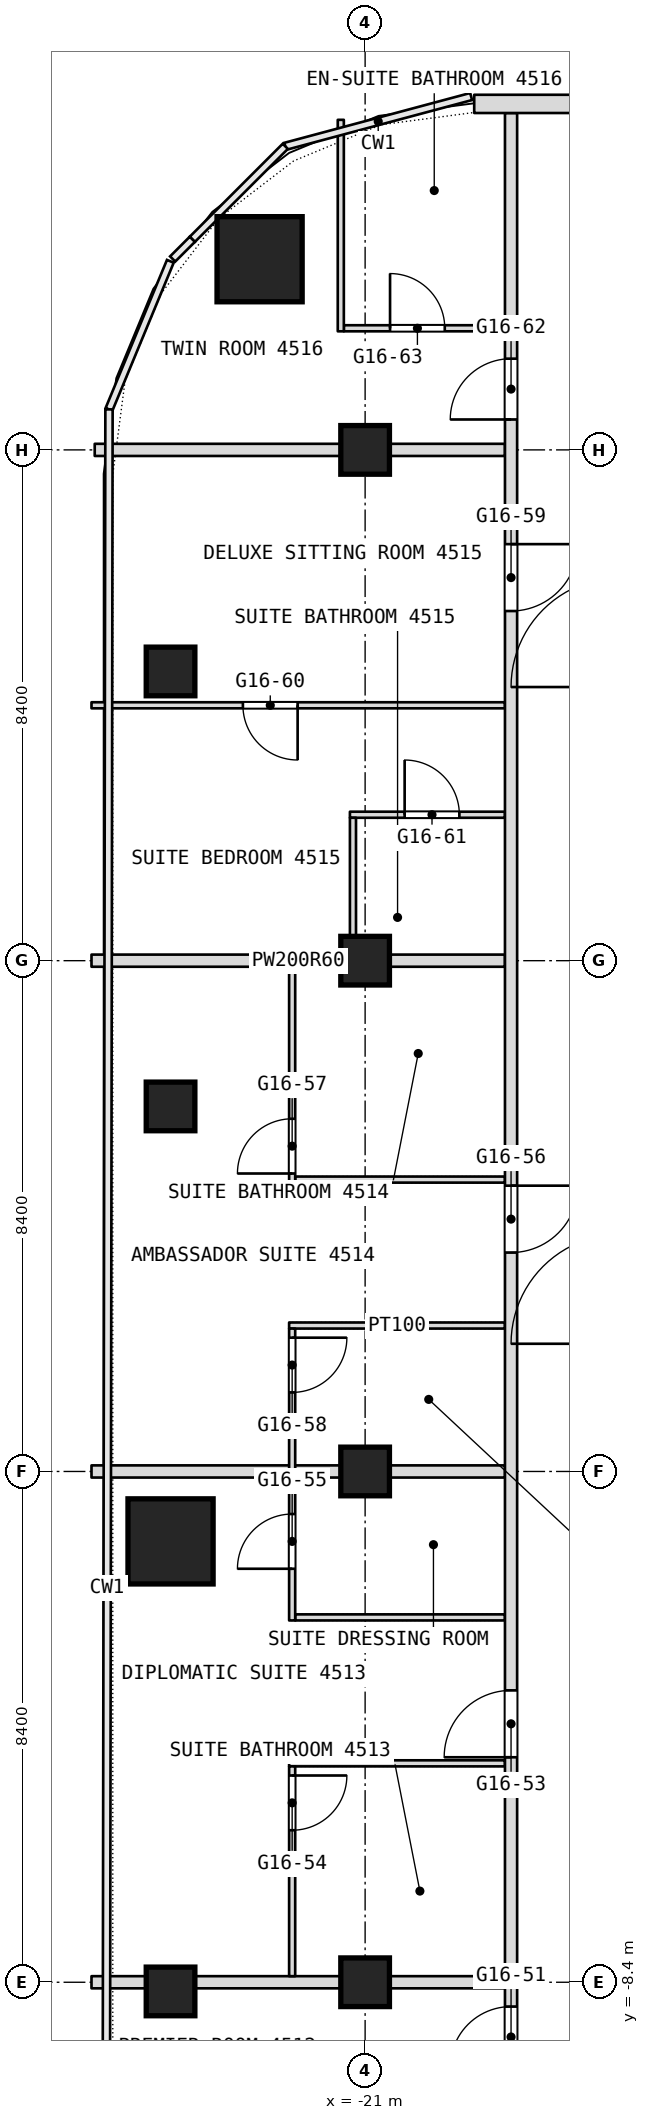
"""IFC4 building model, lengths in metres.
Left out: names, types, materials, properties, quantities, classifications, styles, units other than length and angle.
Written with IfcOpenShell. Run it as: python <this file> out.ifc"""

import sys

from ifc_helpers import new_model, si_unit, direction, frame, frame_2d, origin, origin_2d, place, context, subcontext, project, spatial, rectangle, extrude, element, fill, save


model = new_model("IFC4")
c1 = context("Model", 3, precision=1e-05, world=origin(), true_north=direction((0.0, 1.0)))
c2 = subcontext(c1, "Body", "Model", "MODEL_VIEW")
j1 = project(units=[si_unit("LENGTHUNIT", "METRE"), si_unit("PLANEANGLEUNIT", "RADIAN")], contexts=[c1])
p1 = place(None, origin())
s1 = spatial("IfcSite", under=j1, at=p1, CompositionType="ELEMENT")
p2 = place(p1, origin())
s2 = spatial("IfcBuilding", under=s1, at=p2, CompositionType="ELEMENT")
p3 = place(p2, frame((0.0, 0.0, 198.5)))
s3 = spatial("IfcBuildingStorey", under=s2, at=p3, CompositionType="ELEMENT", Elevation=198.5)
for number, where, z_axis, x_axis in (
    (1, (-22.736, 19.936, 0.0), (0.0, 0.0, 1.0), (1.0, 0.0, 0.0)),
    (2, (-24.2, -1.15, 0.0), (0.0, 0.0, 1.0), (1.0, 0.0, 0.0)),
):
    element("IfcColumn", number, at=place(p3, frame(where, z_axis=z_axis, x_axis=x_axis)), inside=s3, PredefinedType="COLUMN", context=c2, shape_type="SweptSolid", body=[
        extrude(rectangle(XDim=1.4, YDim=1.4, at=origin_2d()), origin(), (0.0, 0.0, 1.0), 3.6),
    ])
for number, where, z_axis, x_axis in (
    (3, (-21.0, -8.4, 0.0), (0.0, 0.0, 1.0), (1.0, 0.0, 0.0)),
    (4, (-21.0, 0.0, 0.0), (0.0, 0.0, 1.0), (1.0, 0.0, 0.0)),
    (5, (-21.0, 8.4, 0.0), (0.0, 0.0, 1.0), (1.0, 0.0, 0.0)),
    (6, (-21.0, 16.8, 0.0), (0.0, 0.0, 1.0), (1.0, 0.0, 0.0)),
    (7, (-24.2, -8.551, 0.0), (0.0, 0.0, 1.0), (1.0, 0.0, 0.0)),
    (8, (-24.2, 6.003, 0.0), (0.0, 0.0, 1.0), (1.0, 0.0, 0.0)),
    (9, (-24.2, 13.156, 0.0), (0.0, 0.0, 1.0), (1.0, 0.0, 0.0)),
):
    element("IfcColumn", number, at=place(p3, frame(where, z_axis=z_axis, x_axis=x_axis)), inside=s3, PredefinedType="COLUMN", context=c2, shape_type="SweptSolid", body=[
        extrude(rectangle(XDim=0.8, YDim=0.8, at=origin_2d()), origin(), (0.0, 0.0, 1.0), 3.6),
    ])
p4 = place(p3, frame((-25.5, -8.4, 0.0), z_axis=(0.0, 0.0, 1.0), x_axis=(1.0, 0.0, 0.0)))
e10 = element("IfcWall", 10, at=p4, inside=s3, PredefinedType="PARTITIONING", context=c2, shape_type="SweptSolid", body=[
    extrude(rectangle(XDim=6.8, YDim=0.2, at=frame_2d((3.4, 0.0))), origin(), (0.0, 0.0, 1.0), 2.94),
])
p5 = place(p3, frame((-22.25, -4.8, 0.0), z_axis=(0.0, 0.0, 1.0), x_axis=(1.0, 0.0, 0.0)))
e11 = element("IfcWall", 11, at=p5, inside=s3, PredefinedType="PARTITIONING", context=c2, shape_type="SweptSolid", body=[
    extrude(rectangle(XDim=3.55, YDim=0.1, at=frame_2d((1.775, 0.0))), origin(), (0.0, 0.0, 1.0), 3.34),
])
p6 = place(p3, frame((-22.15, -2.4, 0.0), z_axis=(0.0, 0.0, 1.0), x_axis=(1.0, 0.0, 0.0)))
e12 = element("IfcWall", 12, at=p6, inside=s3, PredefinedType="PARTITIONING", context=c2, shape_type="SweptSolid", body=[
    extrude(rectangle(XDim=3.45, YDim=0.1, at=frame_2d((1.725, 0.0))), origin(), (0.0, 0.0, 1.0), 3.34),
])
p7 = place(p3, frame((-25.5, 0.0, 0.0), z_axis=(0.0, 0.0, 1.0), x_axis=(1.0, 0.0, 0.0)))
e13 = element("IfcWall", 13, at=p7, inside=s3, PredefinedType="PARTITIONING", context=c2, shape_type="SweptSolid", body=[
    extrude(rectangle(XDim=6.8, YDim=0.2, at=frame_2d((3.4, 0.0))), origin(), (0.0, 0.0, 1.0), 2.94),
])
p8 = place(p3, frame((-22.25, 2.4, 0.0), z_axis=(0.0, 0.0, 1.0), x_axis=(1.0, 0.0, 0.0)))
e14 = element("IfcWall", 14, at=p8, inside=s3, PredefinedType="PARTITIONING", context=c2, shape_type="SweptSolid", body=[
    extrude(rectangle(XDim=3.55, YDim=0.1, at=frame_2d((1.775, 0.0))), origin(), (0.0, 0.0, 1.0), 3.34),
])
p9 = place(p3, frame((-22.15, 4.8, 0.0), z_axis=(0.0, 0.0, 1.0), x_axis=(1.0, 0.0, 0.0)))
e15 = element("IfcWall", 15, at=p9, inside=s3, PredefinedType="PARTITIONING", context=c2, shape_type="SweptSolid", body=[
    extrude(rectangle(XDim=3.45, YDim=0.1, at=frame_2d((1.725, 0.0))), origin(), (0.0, 0.0, 1.0), 3.34),
])
p10 = place(p3, frame((-25.5, 8.4, 0.0), z_axis=(0.0, 0.0, 1.0), x_axis=(1.0, 0.0, 0.0)))
e16 = element("IfcWall", 16, at=p10, inside=s3, PredefinedType="PARTITIONING", context=c2, shape_type="SweptSolid", body=[
    extrude(rectangle(XDim=6.8, YDim=0.2, at=frame_2d((3.4, 0.0))), origin(), (0.0, 0.0, 1.0), 2.94),
])
p11 = place(p3, frame((-21.25, 10.8, 0.0), z_axis=(0.0, 0.0, 1.0), x_axis=(1.0, 0.0, 0.0)))
e17 = element("IfcWall", 17, at=p11, inside=s3, PredefinedType="PARTITIONING", context=c2, shape_type="SweptSolid", body=[
    extrude(rectangle(XDim=2.55, YDim=0.1, at=frame_2d((1.275, 0.0))), origin(), (0.0, 0.0, 1.0), 3.34),
])
p12 = place(p11, frame((0.9, 0.0, 0.0)))
e18 = element("IfcOpeningElement", 18, at=p12, cuts=e17, PredefinedType="OPENING", context=c2, shape_type="SweptSolid", body=[
    extrude(rectangle(XDim=0.9, YDim=2.1, at=frame_2d((0.45, 1.05))), frame((0.0, 0.05, 0.0), z_axis=(0.0, -1.0, 0.0), x_axis=(1.0, 0.0, 0.0)), (0.0, 0.0, 1.0), 0.1),
])
p13 = place(p3, frame((-25.5, 12.6, 0.0), z_axis=(0.0, 0.0, 1.0), x_axis=(1.0, 0.0, 0.0)))
e19 = element("IfcWall", 19, at=p13, inside=s3, PredefinedType="PARTITIONING", context=c2, shape_type="SweptSolid", body=[
    extrude(rectangle(XDim=6.8, YDim=0.1, at=frame_2d((3.4, 0.0))), origin(), (0.0, 0.0, 1.0), 3.34),
])
p14 = place(p13, frame((2.49, 0.0, 0.0)))
e20 = element("IfcOpeningElement", 20, at=p14, cuts=e19, PredefinedType="OPENING", context=c2, shape_type="SweptSolid", body=[
    extrude(rectangle(XDim=0.9, YDim=2.1, at=frame_2d((0.45, 1.05))), frame((0.0, 0.05, 0.0), z_axis=(0.0, -1.0, 0.0), x_axis=(1.0, 0.0, 0.0)), (0.0, 0.0, 1.0), 0.1),
])
p15 = place(p3, frame((-25.447, 16.8, 0.0), z_axis=(0.0, 0.0, 1.0), x_axis=(1.0, 0.0, 0.0)))
e21 = element("IfcWall", 21, at=p15, inside=s3, PredefinedType="PARTITIONING", context=c2, shape_type="SweptSolid", body=[
    extrude(rectangle(XDim=6.747, YDim=0.2, at=frame_2d((3.374, 0.0))), origin(), (0.0, 0.0, 1.0), 2.94),
])
p16 = place(p3, frame((-18.6, -26.751, 0.0), z_axis=(0.0, 0.0, 1.0), x_axis=(0.0, 1.0, 0.0)))
e22 = element("IfcWall", 22, at=p16, inside=s3, PredefinedType="PARTITIONING", context=c2, shape_type="SweptSolid", body=[
    extrude(rectangle(XDim=49.091, YDim=0.2, at=frame_2d((24.545, 0.0))), origin(), (0.0, 0.0, 1.0), 3.34),
])
p17 = place(p16, frame((4.576, 0.0, 0.0)))
e23 = element("IfcOpeningElement", 23, at=p17, cuts=e22, PredefinedType="OPENING", context=c2, shape_type="SweptSolid", body=[
    extrude(rectangle(XDim=1.1, YDim=2.1, at=frame_2d((0.55, 1.05))), frame((0.0, 0.1, 0.0), z_axis=(0.0, -1.0, 0.0), x_axis=(1.0, 0.0, 0.0)), (0.0, 0.0, 1.0), 0.2),
])
p18 = place(p16, frame((10.351, 0.0, 0.0)))
e24 = element("IfcOpeningElement", 24, at=p18, cuts=e22, PredefinedType="OPENING", context=c2, shape_type="SweptSolid", body=[
    extrude(rectangle(XDim=1.0, YDim=2.1, at=frame_2d((0.5, 1.05))), frame((0.0, 0.1, 0.0), z_axis=(0.0, -1.0, 0.0), x_axis=(1.0, 0.0, 0.0)), (0.0, 0.0, 1.0), 0.2),
])
p19 = place(p16, frame((16.951, 0.0, 0.0)))
e25 = element("IfcOpeningElement", 25, at=p19, cuts=e22, PredefinedType="OPENING", context=c2, shape_type="SweptSolid", body=[
    extrude(rectangle(XDim=1.0, YDim=2.1, at=frame_2d((0.5, 1.05))), frame((0.0, 0.1, 0.0), z_axis=(0.0, -1.0, 0.0), x_axis=(1.0, 0.0, 0.0)), (0.0, 0.0, 1.0), 0.2),
])
p20 = place(p16, frame((22.051, 0.0, 0.0)))
e26 = element("IfcOpeningElement", 26, at=p20, cuts=e22, PredefinedType="OPENING", context=c2, shape_type="SweptSolid", body=[
    extrude(rectangle(XDim=1.1, YDim=2.1, at=frame_2d((0.55, 1.05))), frame((0.0, 0.1, 0.0), z_axis=(0.0, -1.0, 0.0), x_axis=(1.0, 0.0, 0.0)), (0.0, 0.0, 1.0), 0.2),
])
p21 = place(p16, frame((30.351, 0.0, 0.0)))
e27 = element("IfcOpeningElement", 27, at=p21, cuts=e22, PredefinedType="OPENING", context=c2, shape_type="SweptSolid", body=[
    extrude(rectangle(XDim=1.1, YDim=2.1, at=frame_2d((0.55, 1.05))), frame((0.0, 0.1, 0.0), z_axis=(0.0, -1.0, 0.0), x_axis=(1.0, 0.0, 0.0)), (0.0, 0.0, 1.0), 0.2),
])
p22 = place(p16, frame((40.901, 0.0, 0.0)))
e28 = element("IfcOpeningElement", 28, at=p22, cuts=e22, PredefinedType="OPENING", context=c2, shape_type="SweptSolid", body=[
    extrude(rectangle(XDim=1.1, YDim=2.1, at=frame_2d((0.55, 1.05))), frame((0.0, 0.1, 0.0), z_axis=(0.0, -1.0, 0.0), x_axis=(1.0, 0.0, 0.0)), (0.0, 0.0, 1.0), 0.2),
])
p23 = place(p16, frame((44.051, 0.0, 0.0)))
e29 = element("IfcOpeningElement", 29, at=p23, cuts=e22, PredefinedType="OPENING", context=c2, shape_type="SweptSolid", body=[
    extrude(rectangle(XDim=1.0, YDim=2.1, at=frame_2d((0.5, 1.05))), frame((0.0, 0.1, 0.0), z_axis=(0.0, -1.0, 0.0), x_axis=(1.0, 0.0, 0.0)), (0.0, 0.0, 1.0), 0.2),
])
p24 = place(p3, frame((-21.35, 18.8, 0.0), z_axis=(0.0, 0.0, 1.0), x_axis=(1.0, 0.0, 0.0)))
e30 = element("IfcWall", 30, at=p24, inside=s3, PredefinedType="PARTITIONING", context=c2, shape_type="SweptSolid", body=[
    extrude(rectangle(XDim=2.65, YDim=0.1, at=frame_2d((1.325, 0.0))), origin(), (0.0, 0.0, 1.0), 3.34),
])
p25 = place(p24, frame((0.76, 0.0, 0.0)))
e31 = element("IfcOpeningElement", 31, at=p25, cuts=e30, PredefinedType="OPENING", context=c2, shape_type="SweptSolid", body=[
    extrude(rectangle(XDim=0.9, YDim=2.1, at=frame_2d((0.45, 1.05))), frame((0.0, 0.05, 0.0), z_axis=(0.0, -1.0, 0.0), x_axis=(1.0, 0.0, 0.0)), (0.0, 0.0, 1.0), 0.1),
])
p26 = place(p3, frame((-21.2, 8.5, 0.0), z_axis=(0.0, 0.0, 1.0), x_axis=(0.0, 1.0, 0.0)))
e32 = element("IfcWall", 32, at=p26, inside=s3, PredefinedType="PARTITIONING", context=c2, shape_type="SweptSolid", body=[
    extrude(rectangle(XDim=2.25, YDim=0.1, at=frame_2d((1.125, 0.0))), origin(), (0.0, 0.0, 1.0), 3.34),
])
p27 = place(p3, frame((-21.4, 18.75, 0.0), z_axis=(0.0, 0.0, 1.0), x_axis=(0.0, 1.0, 0.0)))
e33 = element("IfcWall", 33, at=p27, inside=s3, PredefinedType="PARTITIONING", context=c2, shape_type="SweptSolid", body=[
    extrude(rectangle(XDim=3.478, YDim=0.1, at=frame_2d((1.739, 0.0))), origin(), (0.0, 0.0, 1.0), 3.34),
])
p28 = place(p3, frame((-22.2, -8.3, 0.0), z_axis=(0.0, 0.0, 1.0), x_axis=(0.0, 1.0, 0.0)))
e34 = element("IfcWall", 34, at=p28, inside=s3, PredefinedType="PARTITIONING", context=c2, shape_type="SweptSolid", body=[
    extrude(rectangle(XDim=3.45, YDim=0.1, at=frame_2d((1.725, 0.0))), origin(), (0.0, 0.0, 1.0), 3.34),
])
p29 = place(p28, frame((2.4, 0.0, 0.0)))
e35 = element("IfcOpeningElement", 35, at=p29, cuts=e34, PredefinedType="OPENING", context=c2, shape_type="SweptSolid", body=[
    extrude(rectangle(XDim=0.9, YDim=2.1, at=frame_2d((0.45, 1.05))), frame((0.0, 0.05, 0.0), z_axis=(0.0, -1.0, 0.0), x_axis=(1.0, 0.0, 0.0)), (0.0, 0.0, 1.0), 0.1),
])
p30 = place(p3, frame((-22.2, -2.45, 0.0), z_axis=(0.0, 0.0, 1.0), x_axis=(0.0, 1.0, 0.0)))
e36 = element("IfcWall", 36, at=p30, inside=s3, PredefinedType="PARTITIONING", context=c2, shape_type="SweptSolid", body=[
    extrude(rectangle(XDim=4.8, YDim=0.1, at=frame_2d((2.4, 0.0))), origin(), (0.0, 0.0, 1.0), 3.34),
])
p31 = place(p30, frame((0.85, 0.0, 0.0)))
e37 = element("IfcOpeningElement", 37, at=p31, cuts=e36, PredefinedType="OPENING", context=c2, shape_type="SweptSolid", body=[
    extrude(rectangle(XDim=0.9, YDim=2.1, at=frame_2d((0.45, 1.05))), frame((0.0, 0.05, 0.0), z_axis=(0.0, -1.0, 0.0), x_axis=(1.0, 0.0, 0.0)), (0.0, 0.0, 1.0), 0.1),
])
p32 = place(p30, frame((3.75, 0.0, 0.0)))
e38 = element("IfcOpeningElement", 38, at=p32, cuts=e36, PredefinedType="OPENING", context=c2, shape_type="SweptSolid", body=[
    extrude(rectangle(XDim=0.9, YDim=2.1, at=frame_2d((0.45, 1.05))), frame((0.0, 0.05, 0.0), z_axis=(0.0, -1.0, 0.0), x_axis=(1.0, 0.0, 0.0)), (0.0, 0.0, 1.0), 0.1),
])
p33 = place(p3, frame((-22.2, 4.75, 0.0), z_axis=(0.0, 0.0, 1.0), x_axis=(0.0, 1.0, 0.0)))
e39 = element("IfcWall", 39, at=p33, inside=s3, PredefinedType="PARTITIONING", context=c2, shape_type="SweptSolid", body=[
    extrude(rectangle(XDim=3.75, YDim=0.1, at=frame_2d((1.875, 0.0))), origin(), (0.0, 0.0, 1.0), 3.34),
])
p34 = place(p33, frame((0.15, 0.0, 0.0)))
e40 = element("IfcOpeningElement", 40, at=p34, cuts=e39, PredefinedType="OPENING", context=c2, shape_type="SweptSolid", body=[
    extrude(rectangle(XDim=0.9, YDim=2.1, at=frame_2d((0.45, 1.05))), frame((0.0, 0.05, 0.0), z_axis=(0.0, -1.0, 0.0), x_axis=(1.0, 0.0, 0.0)), (0.0, 0.0, 1.0), 0.1),
])
p35 = place(p3, frame((19.206, 22.49, 0.0), z_axis=(0.0, 0.0, 1.0), x_axis=(-1.0, 0.0, 0.0)))
e41 = element("IfcWall", 41, at=p35, inside=s3, PredefinedType="NOTDEFINED", context=c2, shape_type="SweptSolid", body=[
    extrude(rectangle(XDim=38.412, YDim=0.3, at=frame_2d((19.206, 0.0))), origin(), (0.0, 0.0, 1.0), 3.6),
])
p36 = place(p35, frame((3.306, 0.0, 0.9)))
e42 = element("IfcOpeningElement", 42, at=p36, cuts=e41, PredefinedType="OPENING", context=c2, shape_type="SweptSolid", body=[
    extrude(rectangle(XDim=2.4, YDim=2.1, at=frame_2d((1.2, 1.05))), frame((0.0, 0.15, 0.0), z_axis=(0.0, -1.0, 0.0), x_axis=(1.0, 0.0, 0.0)), (0.0, 0.0, 1.0), 0.3),
])
p37 = place(p35, frame((7.506, 0.0, 0.9)))
e43 = element("IfcOpeningElement", 43, at=p37, cuts=e41, PredefinedType="OPENING", context=c2, shape_type="SweptSolid", body=[
    extrude(rectangle(XDim=2.4, YDim=2.1, at=frame_2d((1.2, 1.05))), frame((0.0, 0.15, 0.0), z_axis=(0.0, -1.0, 0.0), x_axis=(1.0, 0.0, 0.0)), (0.0, 0.0, 1.0), 0.3),
])
p38 = place(p35, frame((11.706, 0.0, 0.9)))
e44 = element("IfcOpeningElement", 44, at=p38, cuts=e41, PredefinedType="OPENING", context=c2, shape_type="SweptSolid", body=[
    extrude(rectangle(XDim=2.4, YDim=2.1, at=frame_2d((1.2, 1.05))), frame((0.0, 0.15, 0.0), z_axis=(0.0, -1.0, 0.0), x_axis=(1.0, 0.0, 0.0)), (0.0, 0.0, 1.0), 0.3),
])
p39 = place(p35, frame((15.906, 0.0, 0.9)))
e45 = element("IfcOpeningElement", 45, at=p39, cuts=e41, PredefinedType="OPENING", context=c2, shape_type="SweptSolid", body=[
    extrude(rectangle(XDim=2.4, YDim=2.1, at=frame_2d((1.2, 1.05))), frame((0.0, 0.15, 0.0), z_axis=(0.0, -1.0, 0.0), x_axis=(1.0, 0.0, 0.0)), (0.0, 0.0, 1.0), 0.3),
])
p40 = place(p35, frame((20.106, 0.0, 0.9)))
e46 = element("IfcOpeningElement", 46, at=p40, cuts=e41, PredefinedType="OPENING", context=c2, shape_type="SweptSolid", body=[
    extrude(rectangle(XDim=2.4, YDim=2.1, at=frame_2d((1.2, 1.05))), frame((0.0, 0.15, 0.0), z_axis=(0.0, -1.0, 0.0), x_axis=(1.0, 0.0, 0.0)), (0.0, 0.0, 1.0), 0.3),
])
p41 = place(p35, frame((24.306, 0.0, 0.9)))
e47 = element("IfcOpeningElement", 47, at=p41, cuts=e41, PredefinedType="OPENING", context=c2, shape_type="SweptSolid", body=[
    extrude(rectangle(XDim=2.4, YDim=2.1, at=frame_2d((1.2, 1.05))), frame((0.0, 0.15, 0.0), z_axis=(0.0, -1.0, 0.0), x_axis=(1.0, 0.0, 0.0)), (0.0, 0.0, 1.0), 0.3),
])
p42 = place(p35, frame((28.506, 0.0, 0.9)))
e48 = element("IfcOpeningElement", 48, at=p42, cuts=e41, PredefinedType="OPENING", context=c2, shape_type="SweptSolid", body=[
    extrude(rectangle(XDim=2.4, YDim=2.1, at=frame_2d((1.2, 1.05))), frame((0.0, 0.15, 0.0), z_axis=(0.0, -1.0, 0.0), x_axis=(1.0, 0.0, 0.0)), (0.0, 0.0, 1.0), 0.3),
])
p43 = place(p35, frame((32.706, 0.0, 0.9)))
e49 = element("IfcOpeningElement", 49, at=p43, cuts=e41, PredefinedType="OPENING", context=c2, shape_type="SweptSolid", body=[
    extrude(rectangle(XDim=2.4, YDim=2.1, at=frame_2d((1.2, 1.05))), frame((0.0, 0.15, 0.0), z_axis=(0.0, -1.0, 0.0), x_axis=(1.0, 0.0, 0.0)), (0.0, 0.0, 1.0), 0.3),
])
p44 = place(p12, origin())
e50 = element("IfcDoor", 50, at=p44, inside=s3, OperationType="SINGLE_SWING_LEFT", PredefinedType="DOOR", context=c2, shape_type="SweptSolid", body=[
    extrude(rectangle(XDim=0.9, YDim=2.1, at=frame_2d((0.45, 1.05))), frame((0.0, 0.025, 0.0), z_axis=(0.0, -1.0, 0.0), x_axis=(1.0, 0.0, 0.0)), (0.0, 0.0, 1.0), 0.05),
])
fill(e18, e50)
p45 = place(p14, origin())
e51 = element("IfcDoor", 51, at=p45, inside=s3, OperationType="SINGLE_SWING_RIGHT", PredefinedType="DOOR", context=c2, shape_type="SweptSolid", body=[
    extrude(rectangle(XDim=0.9, YDim=2.1, at=frame_2d((0.45, 1.05))), frame((0.0, 0.025, 0.0), z_axis=(0.0, -1.0, 0.0), x_axis=(1.0, 0.0, 0.0)), (0.0, 0.0, 1.0), 0.05),
])
fill(e20, e51)
p46 = place(p19, origin())
e52 = element("IfcDoor", 52, at=p46, inside=s3, OperationType="SINGLE_SWING_RIGHT", PredefinedType="DOOR", context=c2, shape_type="SweptSolid", body=[
    extrude(rectangle(XDim=1.0, YDim=2.1, at=frame_2d((0.5, 1.05))), frame((0.0, 0.025, 0.0), z_axis=(0.0, -1.0, 0.0), x_axis=(1.0, 0.0, 0.0)), (0.0, 0.0, 1.0), 0.05),
])
fill(e25, e52)
p47 = place(p20, origin())
e53 = element("IfcDoor", 53, at=p47, inside=s3, OperationType="SINGLE_SWING_LEFT", PredefinedType="DOOR", context=c2, shape_type="SweptSolid", body=[
    extrude(rectangle(XDim=1.1, YDim=2.1, at=frame_2d((0.55, 1.05))), frame((0.0, 0.025, 0.0), z_axis=(0.0, -1.0, 0.0), x_axis=(1.0, 0.0, 0.0)), (0.0, 0.0, 1.0), 0.05),
])
fill(e26, e53)
p48 = place(p21, origin())
e54 = element("IfcDoor", 54, at=p48, inside=s3, OperationType="SINGLE_SWING_RIGHT", PredefinedType="DOOR", context=c2, shape_type="SweptSolid", body=[
    extrude(rectangle(XDim=1.1, YDim=2.1, at=frame_2d((0.55, 1.05))), frame((0.0, 0.025, 0.0), z_axis=(0.0, -1.0, 0.0), x_axis=(1.0, 0.0, 0.0)), (0.0, 0.0, 1.0), 0.05),
])
fill(e27, e54)
p49 = place(p22, origin())
e55 = element("IfcDoor", 55, at=p49, inside=s3, OperationType="SINGLE_SWING_RIGHT", PredefinedType="DOOR", context=c2, shape_type="SweptSolid", body=[
    extrude(rectangle(XDim=1.1, YDim=2.1, at=frame_2d((0.55, 1.05))), frame((0.0, 0.025, 0.0), z_axis=(0.0, -1.0, 0.0), x_axis=(1.0, 0.0, 0.0)), (0.0, 0.0, 1.0), 0.05),
])
fill(e28, e55)
p50 = place(p23, origin())
e56 = element("IfcDoor", 56, at=p50, inside=s3, OperationType="SINGLE_SWING_LEFT", PredefinedType="DOOR", context=c2, shape_type="SweptSolid", body=[
    extrude(rectangle(XDim=1.0, YDim=2.1, at=frame_2d((0.5, 1.05))), frame((0.0, 0.025, 0.0), z_axis=(0.0, -1.0, 0.0), x_axis=(1.0, 0.0, 0.0)), (0.0, 0.0, 1.0), 0.05),
])
fill(e29, e56)
p51 = place(p25, origin())
e57 = element("IfcDoor", 57, at=p51, inside=s3, OperationType="SINGLE_SWING_LEFT", PredefinedType="DOOR", context=c2, shape_type="SweptSolid", body=[
    extrude(rectangle(XDim=0.9, YDim=2.1, at=frame_2d((0.45, 1.05))), frame((0.0, 0.025, 0.0), z_axis=(0.0, -1.0, 0.0), x_axis=(1.0, 0.0, 0.0)), (0.0, 0.0, 1.0), 0.05),
])
fill(e31, e57)
p52 = place(p29, origin())
e58 = element("IfcDoor", 58, at=p52, inside=s3, OperationType="SINGLE_SWING_LEFT", PredefinedType="DOOR", context=c2, shape_type="SweptSolid", body=[
    extrude(rectangle(XDim=0.9, YDim=2.1, at=frame_2d((0.45, 1.05))), frame((0.0, 0.025, 0.0), z_axis=(0.0, -1.0, 0.0), x_axis=(1.0, 0.0, 0.0)), (0.0, 0.0, 1.0), 0.05),
])
fill(e35, e58)
p53 = place(p31, origin())
e59 = element("IfcDoor", 59, at=p53, inside=s3, OperationType="SINGLE_SWING_LEFT", PredefinedType="DOOR", context=c2, shape_type="SweptSolid", body=[
    extrude(rectangle(XDim=0.9, YDim=2.1, at=frame_2d((0.45, 1.05))), frame((0.0, 0.025, 0.0), z_axis=(0.0, -1.0, 0.0), x_axis=(1.0, 0.0, 0.0)), (0.0, 0.0, 1.0), 0.05),
])
fill(e37, e59)
p54 = place(p32, origin())
e60 = element("IfcDoor", 60, at=p54, inside=s3, OperationType="SINGLE_SWING_LEFT", PredefinedType="DOOR", context=c2, shape_type="SweptSolid", body=[
    extrude(rectangle(XDim=0.9, YDim=2.1, at=frame_2d((0.45, 1.05))), frame((0.0, 0.025, 0.0), z_axis=(0.0, -1.0, 0.0), x_axis=(1.0, 0.0, 0.0)), (0.0, 0.0, 1.0), 0.05),
])
fill(e38, e60)
p55 = place(p34, origin())
e61 = element("IfcDoor", 61, at=p55, inside=s3, OperationType="SINGLE_SWING_RIGHT", PredefinedType="DOOR", context=c2, shape_type="SweptSolid", body=[
    extrude(rectangle(XDim=0.9, YDim=2.1, at=frame_2d((0.45, 1.05))), frame((0.0, 0.025, 0.0), z_axis=(0.0, -1.0, 0.0), x_axis=(1.0, 0.0, 0.0)), (0.0, 0.0, 1.0), 0.05),
])
fill(e40, e61)
save(model, sys.argv[1])
